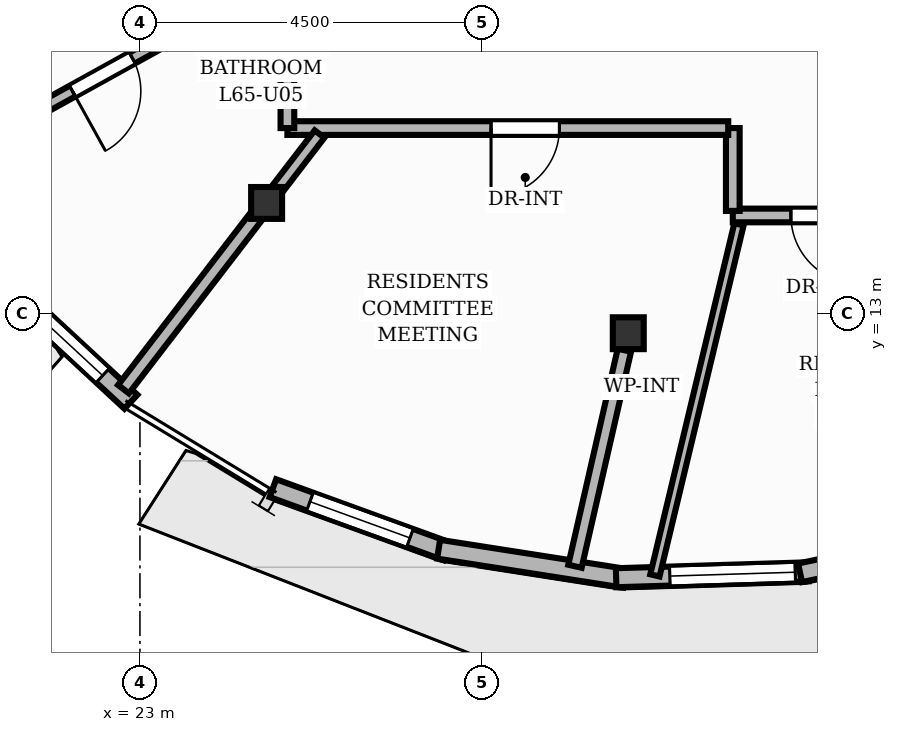
"""IFC4 building model, lengths in metres.
Left out: names, types, materials, properties, quantities, classifications, styles, units other than length and angle.
Written with IfcOpenShell. Run it as: python <this file> out.ifc"""

import sys

from ifc_helpers import new_model, si_unit, direction, frame, frame_2d, origin, origin_2d, place, context, subcontext, project, spatial, rectangle, i_section, extrude, element, fill, save


model = new_model("IFC4")
c1 = context("Model", 3, precision=1e-05, world=origin(), true_north=direction((0.0, 1.0)))
c2 = subcontext(c1, "Body", "Model", "MODEL_VIEW")
j1 = project(units=[si_unit("LENGTHUNIT", "METRE"), si_unit("PLANEANGLEUNIT", "RADIAN")], contexts=[c1])
p1 = place(None, origin())
s1 = spatial("IfcSite", under=j1, at=p1, CompositionType="ELEMENT")
p2 = place(p1, origin())
s2 = spatial("IfcBuilding", under=s1, at=p2, CompositionType="ELEMENT")
p3 = place(p2, frame((0.0, 0.0, 217.44)))
s3 = spatial("IfcBuildingStorey", under=s2, at=p3, CompositionType="ELEMENT", Elevation=217.44)
for number, where, z_axis, x_axis in (
    (1, (24.667, 14.455, 0.0), (0.0, 0.0, 1.0), (1.0, 0.0, 0.0)),
    (2, (29.425, 12.74, 0.0), (0.0, 0.0, 1.0), (1.0, 0.0, 0.0)),
):
    element("IfcColumn", number, at=place(p3, frame(where, z_axis=z_axis, x_axis=x_axis)), inside=s3, PredefinedType="COLUMN", context=c2, shape_type="SweptSolid", body=[
        extrude(i_section(OverallWidth=0.407, OverallDepth=0.419, WebThickness=0.031, FlangeThickness=0.049, at=origin_2d()), origin(), (0.0, 0.0, 1.0), 3.2),
    ])
p4 = place(p3, frame((22.881, 11.839, 0.0), z_axis=(0.0, 0.0, 1.0), x_axis=(-0.733441361842, 0.679752726173, 0.0)))
e3 = element("IfcWall", 3, at=p4, inside=s3, PredefinedType="SOLIDWALL", context=c2, shape_type="SweptSolid", body=[
    extrude(rectangle(XDim=2.415, YDim=0.25, at=frame_2d((1.207, 0.0))), origin(), (0.0, 0.0, 1.0), 2.96),
])
p5 = place(p4, frame((0.507, 0.0, 0.85)))
e4 = element("IfcOpeningElement", 4, at=p5, cuts=e3, PredefinedType="OPENING", context=c2, shape_type="SweptSolid", body=[
    extrude(rectangle(XDim=1.4, YDim=1.55, at=frame_2d((0.7, 0.775))), frame((0.0, 0.135, 0.0), z_axis=(0.0, -1.0, 0.0), x_axis=(1.0, 0.0, 0.0)), (0.0, 0.0, 1.0), 0.27),
])
p6 = place(p3, frame((27.04, 9.87, 0.0), z_axis=(0.0, 0.0, 1.0), x_axis=(-0.939954186413, 0.341300640851, 0.0)))
e5 = element("IfcWall", 5, at=p6, inside=s3, PredefinedType="SOLIDWALL", context=c2, shape_type="SweptSolid", body=[
    extrude(rectangle(XDim=2.437, YDim=0.25, at=frame_2d((1.219, 0.0))), origin(), (0.0, 0.0, 1.0), 2.96),
])
p7 = place(p6, frame((0.518, 0.0, 0.85)))
e6 = element("IfcOpeningElement", 6, at=p7, cuts=e5, PredefinedType="OPENING", context=c2, shape_type="SweptSolid", body=[
    extrude(rectangle(XDim=1.4, YDim=1.55, at=frame_2d((0.7, 0.775))), frame((0.0, 0.135, 0.0), z_axis=(0.0, -1.0, 0.0), x_axis=(1.0, 0.0, 0.0)), (0.0, 0.0, 1.0), 0.27),
])
p8 = place(p3, frame((29.378, 9.516, 0.0), z_axis=(0.0, 0.0, 1.0), x_axis=(-0.988040195026, 0.154196540209, 0.0)))
e7 = element("IfcWall", 7, at=p8, inside=s3, PredefinedType="SOLIDWALL", context=c2, shape_type="SweptSolid", body=[
    extrude(rectangle(XDim=2.478, YDim=0.25, at=frame_2d((1.239, 0.0))), origin(), (0.0, 0.0, 1.0), 2.96),
])
p9 = place(p3, frame((31.796, 9.601, 0.0), z_axis=(0.0, 0.0, 1.0), x_axis=(-0.999523857129, -0.030855453818, 0.0)))
e8 = element("IfcWall", 8, at=p9, inside=s3, PredefinedType="SOLIDWALL", context=c2, shape_type="SweptSolid", body=[
    extrude(rectangle(XDim=2.532, YDim=0.25, at=frame_2d((1.266, 0.0))), origin(), (0.0, 0.0, 1.0), 2.96),
])
p10 = place(p9, frame((0.175, 0.0, 0.85)))
e9 = element("IfcOpeningElement", 9, at=p10, cuts=e8, PredefinedType="OPENING", context=c2, shape_type="SweptSolid", body=[
    extrude(rectangle(XDim=1.65, YDim=1.55, at=frame_2d((0.825, 0.775))), frame((0.0, 0.135, 0.0), z_axis=(0.0, -1.0, 0.0), x_axis=(1.0, 0.0, 0.0)), (0.0, 0.0, 1.0), 0.27),
])
p11 = place(p3, frame((34.221, 10.123, 0.0), z_axis=(0.0, 0.0, 1.0), x_axis=(-0.978434707222, -0.206556345104, 0.0)))
e10 = element("IfcWall", 10, at=p11, inside=s3, PredefinedType="SOLIDWALL", context=c2, shape_type="SweptSolid", body=[
    extrude(rectangle(XDim=2.592, YDim=0.25, at=frame_2d((1.296, 0.0))), origin(), (0.0, 0.0, 1.0), 2.96),
])
p12 = place(p3, frame((24.527, 14.273, 0.0), z_axis=(0.0, 0.0, 1.0), x_axis=(-0.609244614772, -0.792982344931, 0.0)))
e11 = element("IfcWall", 11, at=p12, inside=s3, PredefinedType="PARTITIONING", context=c2, shape_type="SweptSolid", body=[
    extrude(rectangle(XDim=2.861, YDim=0.18, at=frame_2d((1.43, 0.0))), origin(), (0.0, 0.0, 1.0), 2.404),
])
p13 = place(p3, frame((29.374, 12.517, 0.0), z_axis=(0.0, 0.0, 1.0), x_axis=(-0.222945280676, -0.974830960641, 0.0)))
e12 = element("IfcWall", 12, at=p13, inside=s3, PredefinedType="PARTITIONING", context=c2, shape_type="SweptSolid", body=[
    extrude(rectangle(XDim=2.916, YDim=0.18, at=frame_2d((1.458, 0.0))), origin(), (0.0, 0.0, 1.0), 2.404),
])
p14 = place(p3, frame((33.14, 14.29, 0.0), z_axis=(0.0, 0.0, 1.0), x_axis=(-1.0, 0.0, 0.0)))
e13 = element("IfcWall", 13, at=p14, inside=s3, PredefinedType="PARTITIONING", context=c2, shape_type="SweptSolid", body=[
    extrude(rectangle(XDim=2.34, YDim=0.18, at=frame_2d((1.17, 0.0))), origin(), (0.0, 0.0, 1.0), 2.955),
])
p15 = place(p14, frame((0.676, 0.0, 0.0)))
e14 = element("IfcOpeningElement", 14, at=p15, cuts=e13, PredefinedType="OPENING", context=c2, shape_type="SweptSolid", body=[
    extrude(rectangle(XDim=0.9, YDim=2.1, at=frame_2d((0.45, 1.05))), frame((0.0, 0.1, 0.0), z_axis=(0.0, -1.0, 0.0), x_axis=(1.0, 0.0, 0.0)), (0.0, 0.0, 1.0), 0.2),
])
p16 = place(p3, frame((30.8, 14.35, 0.0), z_axis=(0.0, 0.0, 1.0), x_axis=(0.0, 1.0, 0.0)))
e15 = element("IfcWall", 15, at=p16, inside=s3, PredefinedType="PARTITIONING", context=c2, shape_type="SweptSolid", body=[
    extrude(rectangle(XDim=1.09, YDim=0.18, at=frame_2d((0.545, 0.0))), origin(), (0.0, 0.0, 1.0), 2.955),
])
p17 = place(p3, frame((30.74, 15.44, 0.0), z_axis=(0.0, 0.0, 1.0), x_axis=(-1.0, 0.0, 0.0)))
e16 = element("IfcWall", 16, at=p17, inside=s3, PredefinedType="PARTITIONING", context=c2, shape_type="SweptSolid", body=[
    extrude(rectangle(XDim=5.8, YDim=0.18, at=frame_2d((2.9, 0.0))), origin(), (0.0, 0.0, 1.0), 2.955),
])
p18 = place(p17, frame((2.221, 0.0, 0.0)))
e17 = element("IfcOpeningElement", 17, at=p18, cuts=e16, PredefinedType="OPENING", context=c2, shape_type="SweptSolid", body=[
    extrude(rectangle(XDim=0.9, YDim=2.1, at=frame_2d((0.45, 1.05))), frame((0.0, 0.1, 0.0), z_axis=(0.0, -1.0, 0.0), x_axis=(1.0, 0.0, 0.0)), (0.0, 0.0, 1.0), 0.2),
])
p19 = place(p3, frame((24.94, 15.44, 0.0), z_axis=(0.0, 0.0, 1.0), x_axis=(0.0, 1.0, 0.0)))
e18 = element("IfcWall", 18, at=p19, inside=s3, PredefinedType="PARTITIONING", context=c2, shape_type="SweptSolid", body=[
    extrude(rectangle(XDim=17.12, YDim=0.18, at=frame_2d((8.56, 0.0))), origin(), (0.0, 0.0, 1.0), 2.955),
])
p20 = place(p19, frame((4.404, 0.0, 0.0)))
e19 = element("IfcOpeningElement", 19, at=p20, cuts=e18, PredefinedType="OPENING", context=c2, shape_type="SweptSolid", body=[
    extrude(rectangle(XDim=1.05, YDim=2.15, at=frame_2d((0.525, 1.075))), frame((0.0, 0.1, 0.0), z_axis=(0.0, -1.0, 0.0), x_axis=(1.0, 0.0, 0.0)), (0.0, 0.0, 1.0), 0.2),
])
p21 = place(p3, frame((29.775, 9.554, 0.0), z_axis=(0.0, 0.0, 1.0), x_axis=(0.232836379221, 0.972515923012, 0.0)))
e20 = element("IfcWall", 20, at=p21, inside=s3, PredefinedType="PARTITIONING", context=c2, shape_type="SweptSolid", body=[
    extrude(rectangle(XDim=4.75, YDim=0.125, at=frame_2d((2.375, 0.0))), origin(), (0.0, 0.0, 1.0), 2.955),
])
p22 = place(p3, frame((24.806, 14.636, 0.0), z_axis=(0.0, 0.0, 1.0), x_axis=(0.609284308489, 0.792951846854, 0.0)))
e21 = element("IfcWall", 21, at=p22, inside=s3, PredefinedType="PLUMBINGWALL", context=c2, shape_type="SweptSolid", body=[
    extrude(rectangle(XDim=0.913, YDim=0.16, at=frame_2d((0.457, 0.0))), origin(), (0.0, 0.0, 1.0), 2.404),
])
p23 = place(p3, frame((24.853, 17.443, 0.0), z_axis=(0.0, 0.0, 1.0), x_axis=(-0.874969642777, -0.484177781624, 0.0)))
e22 = element("IfcWall", 22, at=p23, inside=s3, PredefinedType="PLUMBINGWALL", context=c2, shape_type="SweptSolid", body=[
    extrude(rectangle(XDim=5.365, YDim=0.16, at=frame_2d((2.682, 0.0))), origin(), (0.0, 0.0, 1.0), 2.955),
])
p24 = place(p23, frame((2.232, 0.0, 0.0)))
e23 = element("IfcOpeningElement", 23, at=p24, cuts=e22, PredefinedType="OPENING", context=c2, shape_type="SweptSolid", body=[
    extrude(rectangle(XDim=0.9, YDim=2.1, at=frame_2d((0.45, 1.05))), frame((0.0, 0.09, 0.0), z_axis=(0.0, -1.0, 0.0), x_axis=(1.0, 0.0, 0.0)), (0.0, 0.0, 1.0), 0.18),
])
p25 = place(p5, origin())
e24 = element("IfcWindow", 24, at=p25, inside=s3, PartitioningType="SINGLE_PANEL", PredefinedType="WINDOW", context=c2, shape_type="SweptSolid", body=[
    extrude(rectangle(XDim=1.4, YDim=1.55, at=frame_2d((0.7, 0.775))), frame((0.0, 0.03, 0.0), z_axis=(0.0, -1.0, 0.0), x_axis=(1.0, 0.0, 0.0)), (0.0, 0.0, 1.0), 0.06),
])
fill(e4, e24)
p26 = place(p7, origin())
e25 = element("IfcWindow", 25, at=p26, inside=s3, PartitioningType="SINGLE_PANEL", PredefinedType="WINDOW", context=c2, shape_type="SweptSolid", body=[
    extrude(rectangle(XDim=1.4, YDim=1.55, at=frame_2d((0.7, 0.775))), frame((0.0, 0.03, 0.0), z_axis=(0.0, -1.0, 0.0), x_axis=(1.0, 0.0, 0.0)), (0.0, 0.0, 1.0), 0.06),
])
fill(e6, e25)
p27 = place(p10, origin())
e26 = element("IfcWindow", 26, at=p27, inside=s3, PartitioningType="SINGLE_PANEL", PredefinedType="WINDOW", context=c2, shape_type="SweptSolid", body=[
    extrude(rectangle(XDim=1.65, YDim=1.55, at=frame_2d((0.825, 0.775))), frame((0.0, 0.03, 0.0), z_axis=(0.0, -1.0, 0.0), x_axis=(1.0, 0.0, 0.0)), (0.0, 0.0, 1.0), 0.06),
])
fill(e9, e26)
p28 = place(p15, origin())
e27 = element("IfcDoor", 27, at=p28, inside=s3, OperationType="SINGLE_SWING_LEFT", PredefinedType="DOOR", context=c2, shape_type="SweptSolid", body=[
    extrude(rectangle(XDim=0.9, YDim=2.1, at=frame_2d((0.45, 1.05))), frame((0.0, 0.025, 0.0), z_axis=(0.0, -1.0, 0.0), x_axis=(1.0, 0.0, 0.0)), (0.0, 0.0, 1.0), 0.05),
])
fill(e14, e27)
p29 = place(p18, origin())
e28 = element("IfcDoor", 28, at=p29, inside=s3, OperationType="SINGLE_SWING_RIGHT", PredefinedType="DOOR", context=c2, shape_type="SweptSolid", body=[
    extrude(rectangle(XDim=0.9, YDim=2.1, at=frame_2d((0.45, 1.05))), frame((0.0, 0.025, 0.0), z_axis=(0.0, -1.0, 0.0), x_axis=(1.0, 0.0, 0.0)), (0.0, 0.0, 1.0), 0.05),
])
fill(e17, e28)
p30 = place(p24, origin())
e29 = element("IfcDoor", 29, at=p30, inside=s3, OperationType="SINGLE_SWING_RIGHT", PredefinedType="DOOR", context=c2, shape_type="SweptSolid", body=[
    extrude(rectangle(XDim=0.9, YDim=2.1, at=frame_2d((0.45, 1.05))), frame((0.0, 0.025, 0.0), z_axis=(0.0, -1.0, 0.0), x_axis=(1.0, 0.0, 0.0)), (0.0, 0.0, 1.0), 0.05),
])
fill(e23, e29)
save(model, sys.argv[1])
